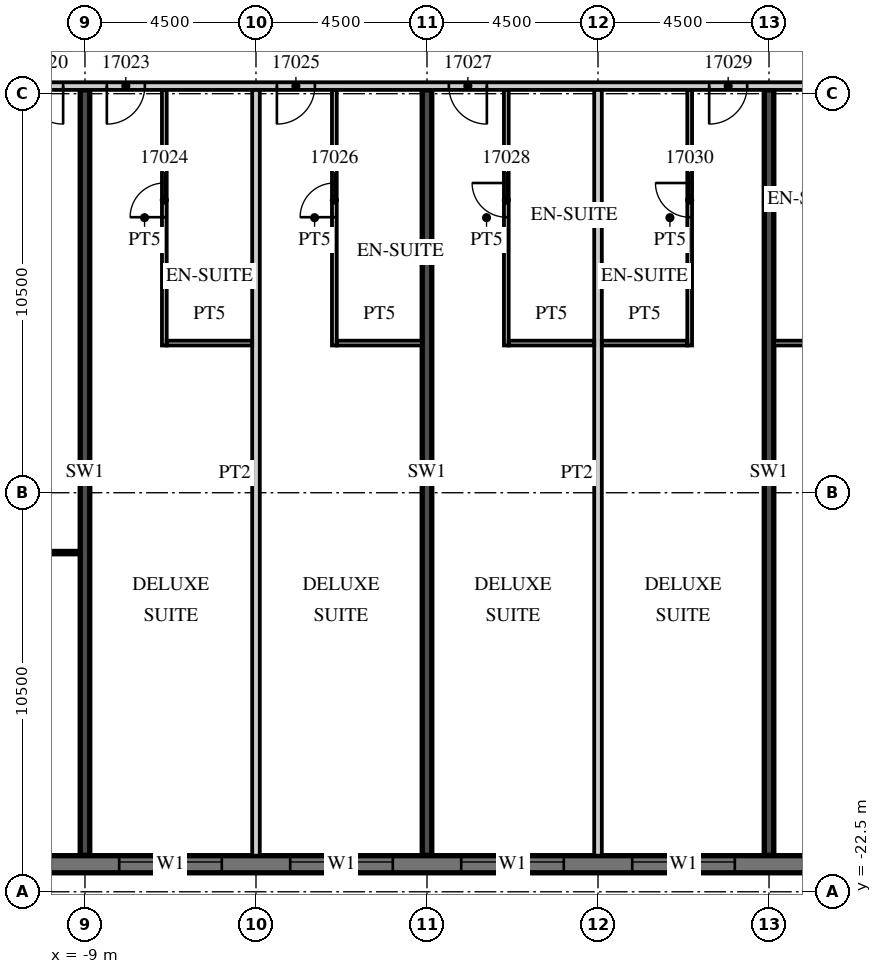
"""IFC4 building model, lengths in metres.
Left out: names, types, materials, properties, quantities, classifications, styles, units other than length and angle.
Written with IfcOpenShell. Run it as: python <this file> out.ifc"""

import sys

from ifc_helpers import new_model, si_unit, direction, frame, frame_2d, origin, place, context, subcontext, project, spatial, rectangle, extrude, element, fill, save


model = new_model("IFC4")
c1 = context("Model", 3, precision=1e-05, world=origin(), true_north=direction((0.0, 1.0)))
c2 = subcontext(c1, "Body", "Model", "MODEL_VIEW")
j1 = project(units=[si_unit("LENGTHUNIT", "METRE"), si_unit("PLANEANGLEUNIT", "RADIAN")], contexts=[c1])
p1 = place(None, origin())
s1 = spatial("IfcSite", under=j1, at=p1, CompositionType="ELEMENT")
p2 = place(p1, origin())
s2 = spatial("IfcBuilding", under=s1, at=p2, CompositionType="ELEMENT")
p3 = place(p2, frame((0.0, 0.0, 86.4)))
s3 = spatial("IfcBuildingStorey", under=s2, at=p3, CompositionType="ELEMENT", Elevation=86.4)
for number, where, z_axis, x_axis in (
    (1, (-9.0, -21.54, 0.0), (0.0, 0.0, 1.0), (0.0, 1.0, 0.0)),
    (2, (0.0, -21.54, 0.0), (0.0, 0.0, 1.0), (0.0, 1.0, 0.0)),
    (3, (9.0, -21.54, 0.0), (0.0, 0.0, 1.0), (0.0, 1.0, 0.0)),
):
    element("IfcWall", number, at=place(p3, frame(where, z_axis=z_axis, x_axis=x_axis)), inside=s3, PredefinedType="SHEAR", context=c2, shape_type="SweptSolid", body=[
        extrude(rectangle(XDim=20.14, YDim=0.25, at=frame_2d((10.07, 0.0))), origin(), (0.0, 0.0, 1.0), 3.3),
    ])
p4 = place(p3, frame((-13.5, -21.775, 0.0), z_axis=(0.0, 0.0, 1.0), x_axis=(1.0, 0.0, 0.0)))
e4 = element("IfcWall", 4, at=p4, inside=s3, PredefinedType="SOLIDWALL", context=c2, shape_type="SweptSolid", body=[
    extrude(rectangle(XDim=54.5, YDim=0.45, at=frame_2d((27.25, 0.0))), origin(), (0.0, 0.0, 1.0), 3.02),
])
p5 = place(p4, frame((0.9, 0.0, 0.45)))
e5 = element("IfcOpeningElement", 5, at=p5, cuts=e4, PredefinedType="OPENING", context=c2, shape_type="SweptSolid", body=[
    extrude(rectangle(XDim=2.7, YDim=2.25, at=frame_2d((1.35, 1.125))), frame((0.0, 0.235, 0.0), z_axis=(0.0, -1.0, 0.0), x_axis=(1.0, 0.0, 0.0)), (0.0, 0.0, 1.0), 0.47),
])
p6 = place(p4, frame((5.4, 0.0, 0.45)))
e6 = element("IfcOpeningElement", 6, at=p6, cuts=e4, PredefinedType="OPENING", context=c2, shape_type="SweptSolid", body=[
    extrude(rectangle(XDim=2.7, YDim=2.25, at=frame_2d((1.35, 1.125))), frame((0.0, 0.235, 0.0), z_axis=(0.0, -1.0, 0.0), x_axis=(1.0, 0.0, 0.0)), (0.0, 0.0, 1.0), 0.47),
])
p7 = place(p4, frame((9.9, 0.0, 0.45)))
e7 = element("IfcOpeningElement", 7, at=p7, cuts=e4, PredefinedType="OPENING", context=c2, shape_type="SweptSolid", body=[
    extrude(rectangle(XDim=2.7, YDim=2.25, at=frame_2d((1.35, 1.125))), frame((0.0, 0.235, 0.0), z_axis=(0.0, -1.0, 0.0), x_axis=(1.0, 0.0, 0.0)), (0.0, 0.0, 1.0), 0.47),
])
p8 = place(p4, frame((14.4, 0.0, 0.45)))
e8 = element("IfcOpeningElement", 8, at=p8, cuts=e4, PredefinedType="OPENING", context=c2, shape_type="SweptSolid", body=[
    extrude(rectangle(XDim=2.7, YDim=2.25, at=frame_2d((1.35, 1.125))), frame((0.0, 0.235, 0.0), z_axis=(0.0, -1.0, 0.0), x_axis=(1.0, 0.0, 0.0)), (0.0, 0.0, 1.0), 0.47),
])
p9 = place(p4, frame((18.9, 0.0, 0.45)))
e9 = element("IfcOpeningElement", 9, at=p9, cuts=e4, PredefinedType="OPENING", context=c2, shape_type="SweptSolid", body=[
    extrude(rectangle(XDim=2.7, YDim=2.25, at=frame_2d((1.35, 1.125))), frame((0.0, 0.235, 0.0), z_axis=(0.0, -1.0, 0.0), x_axis=(1.0, 0.0, 0.0)), (0.0, 0.0, 1.0), 0.47),
])
p10 = place(p4, frame((23.4, 0.0, 0.45)))
e10 = element("IfcOpeningElement", 10, at=p10, cuts=e4, PredefinedType="OPENING", context=c2, shape_type="SweptSolid", body=[
    extrude(rectangle(XDim=2.7, YDim=2.25, at=frame_2d((1.35, 1.125))), frame((0.0, 0.235, 0.0), z_axis=(0.0, -1.0, 0.0), x_axis=(1.0, 0.0, 0.0)), (0.0, 0.0, 1.0), 0.47),
])
p11 = place(p4, frame((27.9, 0.0, 0.45)))
e11 = element("IfcOpeningElement", 11, at=p11, cuts=e4, PredefinedType="OPENING", context=c2, shape_type="SweptSolid", body=[
    extrude(rectangle(XDim=2.7, YDim=2.25, at=frame_2d((1.35, 1.125))), frame((0.0, 0.235, 0.0), z_axis=(0.0, -1.0, 0.0), x_axis=(1.0, 0.0, 0.0)), (0.0, 0.0, 1.0), 0.47),
])
p12 = place(p4, frame((32.4, 0.0, 0.45)))
e12 = element("IfcOpeningElement", 12, at=p12, cuts=e4, PredefinedType="OPENING", context=c2, shape_type="SweptSolid", body=[
    extrude(rectangle(XDim=2.7, YDim=2.25, at=frame_2d((1.35, 1.125))), frame((0.0, 0.235, 0.0), z_axis=(0.0, -1.0, 0.0), x_axis=(1.0, 0.0, 0.0)), (0.0, 0.0, 1.0), 0.47),
])
p13 = place(p4, frame((36.9, 0.0, 0.45)))
e13 = element("IfcOpeningElement", 13, at=p13, cuts=e4, PredefinedType="OPENING", context=c2, shape_type="SweptSolid", body=[
    extrude(rectangle(XDim=2.7, YDim=2.25, at=frame_2d((1.35, 1.125))), frame((0.0, 0.235, 0.0), z_axis=(0.0, -1.0, 0.0), x_axis=(1.0, 0.0, 0.0)), (0.0, 0.0, 1.0), 0.47),
])
p14 = place(p4, frame((41.4, 0.0, 0.45)))
e14 = element("IfcOpeningElement", 14, at=p14, cuts=e4, PredefinedType="OPENING", context=c2, shape_type="SweptSolid", body=[
    extrude(rectangle(XDim=2.7, YDim=2.25, at=frame_2d((1.35, 1.125))), frame((0.0, 0.235, 0.0), z_axis=(0.0, -1.0, 0.0), x_axis=(1.0, 0.0, 0.0)), (0.0, 0.0, 1.0), 0.47),
])
p15 = place(p4, frame((45.9, 0.0, 0.45)))
e15 = element("IfcOpeningElement", 15, at=p15, cuts=e4, PredefinedType="OPENING", context=c2, shape_type="SweptSolid", body=[
    extrude(rectangle(XDim=2.7, YDim=2.25, at=frame_2d((1.35, 1.125))), frame((0.0, 0.235, 0.0), z_axis=(0.0, -1.0, 0.0), x_axis=(1.0, 0.0, 0.0)), (0.0, 0.0, 1.0), 0.47),
])
p16 = place(p4, frame((50.4, 0.0, 0.45)))
e16 = element("IfcOpeningElement", 16, at=p16, cuts=e4, PredefinedType="OPENING", context=c2, shape_type="SweptSolid", body=[
    extrude(rectangle(XDim=2.7, YDim=2.25, at=frame_2d((1.35, 1.125))), frame((0.0, 0.235, 0.0), z_axis=(0.0, -1.0, 0.0), x_axis=(1.0, 0.0, 0.0)), (0.0, 0.0, 1.0), 0.47),
])
p17 = place(p3, frame((-13.5, -1.3, 0.0), z_axis=(0.0, 0.0, 1.0), x_axis=(1.0, 0.0, 0.0)))
e17 = element("IfcWall", 17, at=p17, inside=s3, PredefinedType="PARTITIONING", context=c2, shape_type="SweptSolid", body=[
    extrude(rectangle(XDim=58.05, YDim=0.2, at=frame_2d((29.025, 0.0))), origin(), (0.0, 0.0, 1.0), 3.02),
])
p18 = place(p17, frame((2.925, 0.0, 0.0)))
e18 = element("IfcOpeningElement", 18, at=p18, cuts=e17, PredefinedType="OPENING", context=c2, shape_type="SweptSolid", body=[
    extrude(rectangle(XDim=1.0, YDim=2.1, at=frame_2d((0.5, 1.05))), frame((0.0, 0.11, 0.0), z_axis=(0.0, -1.0, 0.0), x_axis=(1.0, 0.0, 0.0)), (0.0, 0.0, 1.0), 0.22),
])
p19 = place(p17, frame((5.075, 0.0, 0.0)))
e19 = element("IfcOpeningElement", 19, at=p19, cuts=e17, PredefinedType="OPENING", context=c2, shape_type="SweptSolid", body=[
    extrude(rectangle(XDim=1.0, YDim=2.1, at=frame_2d((0.5, 1.05))), frame((0.0, 0.11, 0.0), z_axis=(0.0, -1.0, 0.0), x_axis=(1.0, 0.0, 0.0)), (0.0, 0.0, 1.0), 0.22),
])
p20 = place(p17, frame((9.55, 0.0, 0.0)))
e20 = element("IfcOpeningElement", 20, at=p20, cuts=e17, PredefinedType="OPENING", context=c2, shape_type="SweptSolid", body=[
    extrude(rectangle(XDim=1.0, YDim=2.1, at=frame_2d((0.5, 1.05))), frame((0.0, 0.11, 0.0), z_axis=(0.0, -1.0, 0.0), x_axis=(1.0, 0.0, 0.0)), (0.0, 0.0, 1.0), 0.22),
])
p21 = place(p17, frame((14.075, 0.0, 0.0)))
e21 = element("IfcOpeningElement", 21, at=p21, cuts=e17, PredefinedType="OPENING", context=c2, shape_type="SweptSolid", body=[
    extrude(rectangle(XDim=1.0, YDim=2.1, at=frame_2d((0.5, 1.05))), frame((0.0, 0.11, 0.0), z_axis=(0.0, -1.0, 0.0), x_axis=(1.0, 0.0, 0.0)), (0.0, 0.0, 1.0), 0.22),
])
p22 = place(p17, frame((20.925, 0.0, 0.0)))
e22 = element("IfcOpeningElement", 22, at=p22, cuts=e17, PredefinedType="OPENING", context=c2, shape_type="SweptSolid", body=[
    extrude(rectangle(XDim=1.0, YDim=2.1, at=frame_2d((0.5, 1.05))), frame((0.0, 0.11, 0.0), z_axis=(0.0, -1.0, 0.0), x_axis=(1.0, 0.0, 0.0)), (0.0, 0.0, 1.0), 0.22),
])
p23 = place(p17, frame((27.862, 0.0, 0.0)))
e23 = element("IfcOpeningElement", 23, at=p23, cuts=e17, PredefinedType="OPENING", context=c2, shape_type="SweptSolid", body=[
    extrude(rectangle(XDim=1.2, YDim=2.1, at=frame_2d((0.6, 1.05))), frame((0.0, 0.11, 0.0), z_axis=(0.0, -1.0, 0.0), x_axis=(1.0, 0.0, 0.0)), (0.0, 0.0, 1.0), 0.22),
])
p24 = place(p17, frame((34.45, 0.0, 0.0)))
e24 = element("IfcOpeningElement", 24, at=p24, cuts=e17, PredefinedType="OPENING", context=c2, shape_type="SweptSolid", body=[
    extrude(rectangle(XDim=1.0, YDim=2.1, at=frame_2d((0.5, 1.05))), frame((0.0, 0.11, 0.0), z_axis=(0.0, -1.0, 0.0), x_axis=(1.0, 0.0, 0.0)), (0.0, 0.0, 1.0), 0.22),
])
p25 = place(p17, frame((38.925, 0.0, 0.0)))
e25 = element("IfcOpeningElement", 25, at=p25, cuts=e17, PredefinedType="OPENING", context=c2, shape_type="SweptSolid", body=[
    extrude(rectangle(XDim=1.0, YDim=2.1, at=frame_2d((0.5, 1.05))), frame((0.0, 0.11, 0.0), z_axis=(0.0, -1.0, 0.0), x_axis=(1.0, 0.0, 0.0)), (0.0, 0.0, 1.0), 0.22),
])
p26 = place(p17, frame((41.075, 0.0, 0.0)))
e26 = element("IfcOpeningElement", 26, at=p26, cuts=e17, PredefinedType="OPENING", context=c2, shape_type="SweptSolid", body=[
    extrude(rectangle(XDim=1.0, YDim=2.1, at=frame_2d((0.5, 1.05))), frame((0.0, 0.11, 0.0), z_axis=(0.0, -1.0, 0.0), x_axis=(1.0, 0.0, 0.0)), (0.0, 0.0, 1.0), 0.22),
])
p27 = place(p17, frame((45.55, 0.0, 0.0)))
e27 = element("IfcOpeningElement", 27, at=p27, cuts=e17, PredefinedType="OPENING", context=c2, shape_type="SweptSolid", body=[
    extrude(rectangle(XDim=1.0, YDim=2.1, at=frame_2d((0.5, 1.05))), frame((0.0, 0.11, 0.0), z_axis=(0.0, -1.0, 0.0), x_axis=(1.0, 0.0, 0.0)), (0.0, 0.0, 1.0), 0.22),
])
p28 = place(p17, frame((50.075, 0.0, 0.0)))
e28 = element("IfcOpeningElement", 28, at=p28, cuts=e17, PredefinedType="OPENING", context=c2, shape_type="SweptSolid", body=[
    extrude(rectangle(XDim=1.0, YDim=2.1, at=frame_2d((0.5, 1.05))), frame((0.0, 0.11, 0.0), z_axis=(0.0, -1.0, 0.0), x_axis=(1.0, 0.0, 0.0)), (0.0, 0.0, 1.0), 0.22),
])
p29 = place(p17, frame((56.525, 0.0, 0.0)))
e29 = element("IfcOpeningElement", 29, at=p29, cuts=e17, PredefinedType="OPENING", context=c2, shape_type="SweptSolid", body=[
    extrude(rectangle(XDim=1.0, YDim=2.1, at=frame_2d((0.5, 1.05))), frame((0.0, 0.11, 0.0), z_axis=(0.0, -1.0, 0.0), x_axis=(1.0, 0.0, 0.0)), (0.0, 0.0, 1.0), 0.22),
])
p30 = place(p3, frame((-13.4, -13.575, 0.0), z_axis=(0.0, 0.0, 1.0), x_axis=(1.0, 0.0, 0.0)))
e30 = element("IfcWall", 30, at=p30, inside=s3, PredefinedType="PARTITIONING", context=c2, shape_type="SweptSolid", body=[
    extrude(rectangle(XDim=4.275, YDim=0.1, at=frame_2d((2.137, 0.0))), origin(), (0.0, 0.0, 1.0), 3.02),
])
p31 = place(p30, frame((1.988, 0.0, 0.0)))
e31 = element("IfcOpeningElement", 31, at=p31, cuts=e30, PredefinedType="OPENING", context=c2, shape_type="SweptSolid", body=[
    extrude(rectangle(XDim=1.5, YDim=2.1, at=frame_2d((0.75, 1.05))), frame((0.0, 0.06, 0.0), z_axis=(0.0, -1.0, 0.0), x_axis=(1.0, 0.0, 0.0)), (0.0, 0.0, 1.0), 0.12),
])
p32 = place(p3, frame((-4.5, -21.55, 0.0), z_axis=(0.0, 0.0, 1.0), x_axis=(0.0, 1.0, 0.0)))
e32 = element("IfcWall", 32, at=p32, inside=s3, PredefinedType="PARTITIONING", context=c2, shape_type="SweptSolid", body=[
    extrude(rectangle(XDim=20.15, YDim=0.2, at=frame_2d((10.075, 0.0))), origin(), (0.0, 0.0, 1.0), 3.02),
])
p33 = place(p3, frame((-6.912, -8.125, 0.0), z_axis=(0.0, 0.0, 1.0), x_axis=(0.0, 1.0, 0.0)))
e33 = element("IfcWall", 33, at=p33, inside=s3, PredefinedType="PARTITIONING", context=c2, shape_type="SweptSolid", body=[
    extrude(rectangle(XDim=6.725, YDim=0.125, at=frame_2d((3.363, 0.0))), origin(), (0.0, 0.0, 1.0), 3.02),
])
p34 = place(p33, frame((3.375, 0.0, 0.0)))
e34 = element("IfcOpeningElement", 34, at=p34, cuts=e33, PredefinedType="OPENING", context=c2, shape_type="SweptSolid", body=[
    extrude(rectangle(XDim=0.9, YDim=2.1, at=frame_2d((0.45, 1.05))), frame((0.0, 0.073, 0.0), z_axis=(0.0, -1.0, 0.0), x_axis=(1.0, 0.0, 0.0)), (0.0, 0.0, 1.0), 0.145),
])
p35 = place(p3, frame((-6.85, -8.062, 0.0), z_axis=(0.0, 0.0, 1.0), x_axis=(1.0, 0.0, 0.0)))
e35 = element("IfcWall", 35, at=p35, inside=s3, PredefinedType="PARTITIONING", context=c2, shape_type="SweptSolid", body=[
    extrude(rectangle(XDim=2.25, YDim=0.125, at=frame_2d((1.125, 0.0))), origin(), (0.0, 0.0, 1.0), 3.02),
])
p36 = place(p3, frame((-2.438, -8.125, 0.0), z_axis=(0.0, 0.0, 1.0), x_axis=(0.0, 1.0, 0.0)))
e36 = element("IfcWall", 36, at=p36, inside=s3, PredefinedType="PARTITIONING", context=c2, shape_type="SweptSolid", body=[
    extrude(rectangle(XDim=6.725, YDim=0.125, at=frame_2d((3.363, 0.0))), origin(), (0.0, 0.0, 1.0), 3.02),
])
p37 = place(p36, frame((3.375, 0.0, 0.0)))
e37 = element("IfcOpeningElement", 37, at=p37, cuts=e36, PredefinedType="OPENING", context=c2, shape_type="SweptSolid", body=[
    extrude(rectangle(XDim=0.9, YDim=2.1, at=frame_2d((0.45, 1.05))), frame((0.0, 0.073, 0.0), z_axis=(0.0, -1.0, 0.0), x_axis=(1.0, 0.0, 0.0)), (0.0, 0.0, 1.0), 0.145),
])
p38 = place(p3, frame((-2.375, -8.062, 0.0), z_axis=(0.0, 0.0, 1.0), x_axis=(1.0, 0.0, 0.0)))
e38 = element("IfcWall", 38, at=p38, inside=s3, PredefinedType="PARTITIONING", context=c2, shape_type="SweptSolid", body=[
    extrude(rectangle(XDim=2.25, YDim=0.125, at=frame_2d((1.125, 0.0))), origin(), (0.0, 0.0, 1.0), 3.02),
])
p39 = place(p3, frame((4.5, -21.55, 0.0), z_axis=(0.0, 0.0, 1.0), x_axis=(0.0, 1.0, 0.0)))
e39 = element("IfcWall", 39, at=p39, inside=s3, PredefinedType="PARTITIONING", context=c2, shape_type="SweptSolid", body=[
    extrude(rectangle(XDim=20.15, YDim=0.2, at=frame_2d((10.075, 0.0))), origin(), (0.0, 0.0, 1.0), 3.02),
])
p40 = place(p3, frame((2.087, -8.125, 0.0), z_axis=(0.0, 0.0, 1.0), x_axis=(0.0, 1.0, 0.0)))
e40 = element("IfcWall", 40, at=p40, inside=s3, PredefinedType="PARTITIONING", context=c2, shape_type="SweptSolid", body=[
    extrude(rectangle(XDim=6.725, YDim=0.125, at=frame_2d((3.363, 0.0))), origin(), (0.0, 0.0, 1.0), 3.02),
])
p41 = place(p40, frame((3.375, 0.0, 0.0)))
e41 = element("IfcOpeningElement", 41, at=p41, cuts=e40, PredefinedType="OPENING", context=c2, shape_type="SweptSolid", body=[
    extrude(rectangle(XDim=0.9, YDim=2.1, at=frame_2d((0.45, 1.05))), frame((0.0, 0.073, 0.0), z_axis=(0.0, -1.0, 0.0), x_axis=(1.0, 0.0, 0.0)), (0.0, 0.0, 1.0), 0.145),
])
p42 = place(p3, frame((2.15, -8.062, 0.0), z_axis=(0.0, 0.0, 1.0), x_axis=(1.0, 0.0, 0.0)))
e42 = element("IfcWall", 42, at=p42, inside=s3, PredefinedType="PARTITIONING", context=c2, shape_type="SweptSolid", body=[
    extrude(rectangle(XDim=2.25, YDim=0.125, at=frame_2d((1.125, 0.0))), origin(), (0.0, 0.0, 1.0), 3.02),
])
p43 = place(p3, frame((6.912, -8.125, 0.0), z_axis=(0.0, 0.0, 1.0), x_axis=(0.0, 1.0, 0.0)))
e43 = element("IfcWall", 43, at=p43, inside=s3, PredefinedType="PARTITIONING", context=c2, shape_type="SweptSolid", body=[
    extrude(rectangle(XDim=6.725, YDim=0.125, at=frame_2d((3.363, 0.0))), origin(), (0.0, 0.0, 1.0), 3.02),
])
p44 = place(p43, frame((3.375, 0.0, 0.0)))
e44 = element("IfcOpeningElement", 44, at=p44, cuts=e43, PredefinedType="OPENING", context=c2, shape_type="SweptSolid", body=[
    extrude(rectangle(XDim=0.9, YDim=2.1, at=frame_2d((0.45, 1.05))), frame((0.0, 0.073, 0.0), z_axis=(0.0, -1.0, 0.0), x_axis=(1.0, 0.0, 0.0)), (0.0, 0.0, 1.0), 0.145),
])
p45 = place(p3, frame((4.6, -8.062, 0.0), z_axis=(0.0, 0.0, 1.0), x_axis=(1.0, 0.0, 0.0)))
e45 = element("IfcWall", 45, at=p45, inside=s3, PredefinedType="PARTITIONING", context=c2, shape_type="SweptSolid", body=[
    extrude(rectangle(XDim=2.25, YDim=0.125, at=frame_2d((1.125, 0.0))), origin(), (0.0, 0.0, 1.0), 3.02),
])
p46 = place(p3, frame((9.125, -8.062, 0.0), z_axis=(0.0, 0.0, 1.0), x_axis=(1.0, 0.0, 0.0)))
e46 = element("IfcWall", 46, at=p46, inside=s3, PredefinedType="PARTITIONING", context=c2, shape_type="SweptSolid", body=[
    extrude(rectangle(XDim=2.8, YDim=0.125, at=frame_2d((1.4, 0.0))), origin(), (0.0, 0.0, 1.0), 3.02),
])
p47 = place(p6, origin())
e47 = element("IfcWindow", 47, at=p47, inside=s3, PartitioningType="SINGLE_PANEL", PredefinedType="WINDOW", context=c2, shape_type="SweptSolid", body=[
    extrude(rectangle(XDim=2.7, YDim=2.25, at=frame_2d((1.35, 1.125))), frame((0.0, 0.09, 0.0), z_axis=(0.0, -1.0, 0.0), x_axis=(1.0, 0.0, 0.0)), (0.0, 0.0, 1.0), 0.06),
])
fill(e6, e47)
p48 = place(p7, origin())
e48 = element("IfcWindow", 48, at=p48, inside=s3, PartitioningType="SINGLE_PANEL", PredefinedType="WINDOW", context=c2, shape_type="SweptSolid", body=[
    extrude(rectangle(XDim=2.7, YDim=2.25, at=frame_2d((1.35, 1.125))), frame((0.0, 0.09, 0.0), z_axis=(0.0, -1.0, 0.0), x_axis=(1.0, 0.0, 0.0)), (0.0, 0.0, 1.0), 0.06),
])
fill(e7, e48)
p49 = place(p8, origin())
e49 = element("IfcWindow", 49, at=p49, inside=s3, PartitioningType="SINGLE_PANEL", PredefinedType="WINDOW", context=c2, shape_type="SweptSolid", body=[
    extrude(rectangle(XDim=2.7, YDim=2.25, at=frame_2d((1.35, 1.125))), frame((0.0, 0.09, 0.0), z_axis=(0.0, -1.0, 0.0), x_axis=(1.0, 0.0, 0.0)), (0.0, 0.0, 1.0), 0.06),
])
fill(e8, e49)
p50 = place(p9, origin())
e50 = element("IfcWindow", 50, at=p50, inside=s3, PartitioningType="SINGLE_PANEL", PredefinedType="WINDOW", context=c2, shape_type="SweptSolid", body=[
    extrude(rectangle(XDim=2.7, YDim=2.25, at=frame_2d((1.35, 1.125))), frame((0.0, 0.09, 0.0), z_axis=(0.0, -1.0, 0.0), x_axis=(1.0, 0.0, 0.0)), (0.0, 0.0, 1.0), 0.06),
])
fill(e9, e50)
p51 = place(p18, origin())
e51 = element("IfcDoor", 51, at=p51, inside=s3, OperationType="SINGLE_SWING_RIGHT", PredefinedType="DOOR", context=c2, shape_type="SweptSolid", body=[
    extrude(rectangle(XDim=1.0, YDim=2.1, at=frame_2d((0.5, 1.05))), frame((0.0, 0.025, 0.0), z_axis=(0.0, -1.0, 0.0), x_axis=(1.0, 0.0, 0.0)), (0.0, 0.0, 1.0), 0.05),
])
fill(e18, e51)
p52 = place(p19, origin())
e52 = element("IfcDoor", 52, at=p52, inside=s3, OperationType="SINGLE_SWING_LEFT", PredefinedType="DOOR", context=c2, shape_type="SweptSolid", body=[
    extrude(rectangle(XDim=1.0, YDim=2.1, at=frame_2d((0.5, 1.05))), frame((0.0, 0.025, 0.0), z_axis=(0.0, -1.0, 0.0), x_axis=(1.0, 0.0, 0.0)), (0.0, 0.0, 1.0), 0.05),
])
fill(e19, e52)
p53 = place(p34, origin())
e53 = element("IfcDoor", 53, at=p53, inside=s3, OperationType="SINGLE_SWING_LEFT", PredefinedType="DOOR", context=c2, shape_type="SweptSolid", body=[
    extrude(rectangle(XDim=0.9, YDim=2.1, at=frame_2d((0.45, 1.05))), frame((0.0, 0.025, 0.0), z_axis=(0.0, -1.0, 0.0), x_axis=(1.0, 0.0, 0.0)), (0.0, 0.0, 1.0), 0.05),
])
fill(e34, e53)
p54 = place(p20, origin())
e54 = element("IfcDoor", 54, at=p54, inside=s3, OperationType="SINGLE_SWING_LEFT", PredefinedType="DOOR", context=c2, shape_type="SweptSolid", body=[
    extrude(rectangle(XDim=1.0, YDim=2.1, at=frame_2d((0.5, 1.05))), frame((0.0, 0.025, 0.0), z_axis=(0.0, -1.0, 0.0), x_axis=(1.0, 0.0, 0.0)), (0.0, 0.0, 1.0), 0.05),
])
fill(e20, e54)
p55 = place(p37, origin())
e55 = element("IfcDoor", 55, at=p55, inside=s3, OperationType="SINGLE_SWING_LEFT", PredefinedType="DOOR", context=c2, shape_type="SweptSolid", body=[
    extrude(rectangle(XDim=0.9, YDim=2.1, at=frame_2d((0.45, 1.05))), frame((0.0, 0.025, 0.0), z_axis=(0.0, -1.0, 0.0), x_axis=(1.0, 0.0, 0.0)), (0.0, 0.0, 1.0), 0.05),
])
fill(e37, e55)
p56 = place(p21, origin())
e56 = element("IfcDoor", 56, at=p56, inside=s3, OperationType="SINGLE_SWING_RIGHT", PredefinedType="DOOR", context=c2, shape_type="SweptSolid", body=[
    extrude(rectangle(XDim=1.0, YDim=2.1, at=frame_2d((0.5, 1.05))), frame((0.0, 0.025, 0.0), z_axis=(0.0, -1.0, 0.0), x_axis=(1.0, 0.0, 0.0)), (0.0, 0.0, 1.0), 0.05),
])
fill(e21, e56)
p57 = place(p41, origin())
e57 = element("IfcDoor", 57, at=p57, inside=s3, OperationType="SINGLE_SWING_RIGHT", PredefinedType="DOOR", context=c2, shape_type="SweptSolid", body=[
    extrude(rectangle(XDim=0.9, YDim=2.1, at=frame_2d((0.45, 1.05))), frame((0.0, 0.025, 0.0), z_axis=(0.0, -1.0, 0.0), x_axis=(1.0, 0.0, 0.0)), (0.0, 0.0, 1.0), 0.05),
])
fill(e41, e57)
p58 = place(p22, origin())
e58 = element("IfcDoor", 58, at=p58, inside=s3, OperationType="SINGLE_SWING_LEFT", PredefinedType="DOOR", context=c2, shape_type="SweptSolid", body=[
    extrude(rectangle(XDim=1.0, YDim=2.1, at=frame_2d((0.5, 1.05))), frame((0.0, 0.025, 0.0), z_axis=(0.0, -1.0, 0.0), x_axis=(1.0, 0.0, 0.0)), (0.0, 0.0, 1.0), 0.05),
])
fill(e22, e58)
p59 = place(p44, origin())
e59 = element("IfcDoor", 59, at=p59, inside=s3, OperationType="SINGLE_SWING_RIGHT", PredefinedType="DOOR", context=c2, shape_type="SweptSolid", body=[
    extrude(rectangle(XDim=0.9, YDim=2.1, at=frame_2d((0.45, 1.05))), frame((0.0, 0.025, 0.0), z_axis=(0.0, -1.0, 0.0), x_axis=(1.0, 0.0, 0.0)), (0.0, 0.0, 1.0), 0.05),
])
fill(e44, e59)
save(model, sys.argv[1])
